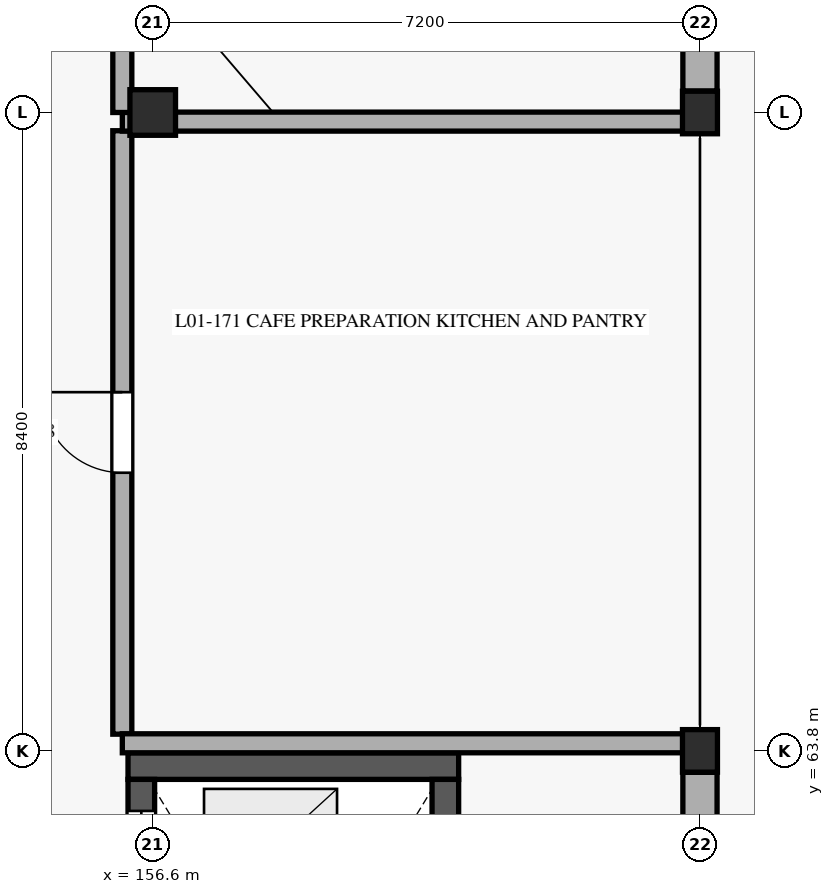
"""IFC4 building model, lengths in metres.
Left out: names, types, materials, properties, quantities, classifications, styles, units other than length and angle.
Written with IfcOpenShell. Run it as: python <this file> out.ifc"""

import sys

from ifc_helpers import new_model, si_unit, direction, frame, frame_2d, origin, origin_with_axes, origin_2d, place, context, subcontext, project, spatial, rectangle, extrude, element, fill, save


model = new_model("IFC4")
c1 = context("Model", 3, precision=1e-05, world=origin(), true_north=direction((0.0, 1.0)))
c2 = subcontext(c1, "Body", "Model", "MODEL_VIEW")
j1 = project(units=[si_unit("LENGTHUNIT", "METRE"), si_unit("PLANEANGLEUNIT", "RADIAN")], contexts=[c1])
p1 = place(None, origin())
s1 = spatial("IfcSite", under=j1, at=p1, CompositionType="ELEMENT")
p2 = place(p1, origin())
s2 = spatial("IfcBuilding", under=s1, at=p2, CompositionType="ELEMENT")
p3 = place(p2, origin())
s3 = spatial("IfcBuildingStorey", under=s2, at=p3, CompositionType="ELEMENT", Elevation=0.0)
p4 = place(p3, frame((156.6, 72.2, 0.0), z_axis=(0.0, 0.0, 1.0), x_axis=(1.0, 0.0, 0.0)))
e1 = element("IfcColumn", 1, at=p4, inside=s3, PredefinedType="COLUMN", context=c2, shape_type="SweptSolid", body=[
    extrude(rectangle(XDim=0.6, YDim=0.6, at=origin_2d()), origin(), (0.0, 0.0, 1.0), 4.8),
])
for number, where, z_axis, x_axis in (
    (2, (163.8, 63.8, 0.0), (0.0, 0.0, 1.0), (1.0, 0.0, 0.0)),
    (3, (163.8, 72.2, 0.0), (0.0, 0.0, 1.0), (1.0, 0.0, 0.0)),
):
    element("IfcColumn", number, at=place(p3, frame(where, z_axis=z_axis, x_axis=x_axis)), inside=s3, PredefinedType="COLUMN", context=c2, shape_type="SweptSolid", body=[
        extrude(rectangle(XDim=0.46, YDim=0.56, at=origin_2d()), origin(), (0.0, 0.0, 1.0), 4.8),
    ])
p5 = place(p3, frame((160.625, 63.6, 0.0), z_axis=(0.0, 0.0, 1.0), x_axis=(-1.0, 0.0, 0.0)))
e4 = element("IfcWall", 4, at=p5, inside=s3, PredefinedType="SHEAR", context=c2, shape_type="SweptSolid", body=[
    extrude(rectangle(XDim=4.35, YDim=0.35, at=frame_2d((2.175, 0.0))), origin(), (0.0, 0.0, 1.0), 4.5),
])
p6 = place(p3, frame((156.45, 63.425, 0.0), z_axis=(0.0, 0.0, 1.0), x_axis=(0.0, -1.0, 0.0)))
e5 = element("IfcWall", 5, at=p6, inside=s3, PredefinedType="SHEAR", context=c2, shape_type="SweptSolid", body=[
    extrude(rectangle(XDim=13.45, YDim=0.35, at=frame_2d((6.725, 0.0))), origin(), (0.0, 0.0, 1.0), 4.5),
])
p7 = place(p6, frame((12.15, 0.0, 0.0)))
e6 = element("IfcOpeningElement", 6, at=p7, cuts=e5, PredefinedType="OPENING", context=c2, shape_type="SweptSolid", body=[
    extrude(rectangle(XDim=1.1, YDim=2.2, at=frame_2d((0.55, 1.1))), frame((0.0, 0.185, 0.0), z_axis=(0.0, -1.0, 0.0), x_axis=(1.0, 0.0, 0.0)), (0.0, 0.0, 1.0), 0.37),
])
p8 = place(p6, frame((4.45, 0.0, 0.0)))
e7 = element("IfcOpeningElement", 7, at=p8, cuts=e5, PredefinedType="OPENING", context=c2, shape_type="SweptSolid", body=[
    extrude(rectangle(XDim=1.15, YDim=2.2, at=frame_2d((0.575, 1.1))), frame((0.0, 0.185, 0.0), z_axis=(0.0, -1.0, 0.0), x_axis=(1.0, 0.0, 0.0)), (0.0, 0.0, 1.0), 0.37),
])
p9 = place(p6, frame((2.315, 0.0, 0.0)))
e8 = element("IfcOpeningElement", 8, at=p9, cuts=e5, PredefinedType="OPENING", context=c2, shape_type="SweptSolid", body=[
    extrude(rectangle(XDim=1.02, YDim=2.15, at=frame_2d((0.51, 1.075))), frame((0.0, 0.185, 0.0), z_axis=(0.0, -1.0, 0.0), x_axis=(1.0, 0.0, 0.0)), (0.0, 0.0, 1.0), 0.37),
])
p10 = place(p6, frame((0.415, 0.0, 0.0)))
e9 = element("IfcOpeningElement", 9, at=p10, cuts=e5, PredefinedType="OPENING", context=c2, shape_type="SweptSolid", body=[
    extrude(rectangle(XDim=1.02, YDim=2.15, at=frame_2d((0.51, 1.075))), frame((0.0, 0.185, 0.0), z_axis=(0.0, -1.0, 0.0), x_axis=(1.0, 0.0, 0.0)), (0.0, 0.0, 1.0), 0.37),
])
p11 = place(p3, frame((160.45, 49.975, 0.0), z_axis=(0.0, 0.0, 1.0), x_axis=(0.0, 1.0, 0.0)))
e10 = element("IfcWall", 10, at=p11, inside=s3, PredefinedType="SHEAR", context=c2, shape_type="SweptSolid", body=[
    extrude(rectangle(XDim=13.45, YDim=0.35, at=frame_2d((6.725, 0.0))), origin(), (0.0, 0.0, 1.0), 4.5),
])
p12 = place(p11, frame((0.2, 0.0, 0.0)))
e11 = element("IfcOpeningElement", 11, at=p12, cuts=e10, PredefinedType="OPENING", context=c2, shape_type="SweptSolid", body=[
    extrude(rectangle(XDim=1.1, YDim=2.2, at=frame_2d((0.55, 1.1))), frame((0.0, 0.185, 0.0), z_axis=(0.0, -1.0, 0.0), x_axis=(1.0, 0.0, 0.0)), (0.0, 0.0, 1.0), 0.37),
])
p13 = place(p3, frame((163.8, 55.682, 0.0), z_axis=(0.0, 0.0, 1.0), x_axis=(0.0, 1.0, 0.0)))
e12 = element("IfcWall", 12, at=p13, inside=s3, PredefinedType="SOLIDWALL", context=c2, shape_type="SweptSolid", body=[
    extrude(rectangle(XDim=7.836, YDim=0.45, at=frame_2d((3.918, 0.0))), origin(), (0.0, 0.0, 1.0), 3.95),
])
p14 = place(p13, frame((1.862, 0.0, 0.65)))
e13 = element("IfcOpeningElement", 13, at=p14, cuts=e12, PredefinedType="OPENING", context=c2, shape_type="SweptSolid", body=[
    extrude(rectangle(XDim=1.5, YDim=2.2, at=frame_2d((0.75, 1.1))), frame((0.0, 0.235, 0.0), z_axis=(0.0, -1.0, 0.0), x_axis=(1.0, 0.0, 0.0)), (0.0, 0.0, 1.0), 0.47),
])
p15 = place(p13, frame((4.474, 0.0, 0.65)))
e14 = element("IfcOpeningElement", 14, at=p15, cuts=e12, PredefinedType="OPENING", context=c2, shape_type="SweptSolid", body=[
    extrude(rectangle(XDim=1.5, YDim=2.2, at=frame_2d((0.75, 1.1))), frame((0.0, 0.235, 0.0), z_axis=(0.0, -1.0, 0.0), x_axis=(1.0, 0.0, 0.0)), (0.0, 0.0, 1.0), 0.47),
])
p16 = place(p3, frame((163.8, 72.482, 0.0), z_axis=(0.0, 0.0, 1.0), x_axis=(0.0, 1.0, 0.0)))
e15 = element("IfcWall", 15, at=p16, inside=s3, PredefinedType="SOLIDWALL", context=c2, shape_type="SweptSolid", body=[
    extrude(rectangle(XDim=7.836, YDim=0.45, at=frame_2d((3.918, 0.0))), origin(), (0.0, 0.0, 1.0), 3.95),
])
p17 = place(p16, frame((1.862, 0.0, 0.65)))
e16 = element("IfcOpeningElement", 16, at=p17, cuts=e15, PredefinedType="OPENING", context=c2, shape_type="SweptSolid", body=[
    extrude(rectangle(XDim=1.5, YDim=2.2, at=frame_2d((0.75, 1.1))), frame((0.0, 0.235, 0.0), z_axis=(0.0, -1.0, 0.0), x_axis=(1.0, 0.0, 0.0)), (0.0, 0.0, 1.0), 0.47),
])
p18 = place(p16, frame((4.474, 0.0, 0.65)))
e17 = element("IfcOpeningElement", 17, at=p18, cuts=e15, PredefinedType="OPENING", context=c2, shape_type="SweptSolid", body=[
    extrude(rectangle(XDim=1.5, YDim=2.2, at=frame_2d((0.75, 1.1))), frame((0.0, 0.235, 0.0), z_axis=(0.0, -1.0, 0.0), x_axis=(1.0, 0.0, 0.0)), (0.0, 0.0, 1.0), 0.47),
])
p19 = place(p3, frame((156.2, 64.02, 0.0), z_axis=(0.0, 0.0, 1.0), x_axis=(0.0, 1.0, 0.0)))
e18 = element("IfcWall", 18, at=p19, inside=s3, PredefinedType="SOLIDWALL", context=c2, shape_type="SweptSolid", body=[
    extrude(rectangle(XDim=7.94, YDim=0.25, at=frame_2d((3.97, 0.0))), origin(), (0.0, 0.0, 1.0), 4.095),
])
p20 = place(p19, frame((3.44, 0.0, 0.0)))
e19 = element("IfcOpeningElement", 19, at=p20, cuts=e18, PredefinedType="OPENING", context=c2, shape_type="SweptSolid", body=[
    extrude(rectangle(XDim=1.06, YDim=2.2, at=frame_2d((0.53, 1.1))), frame((0.0, 0.135, 0.0), z_axis=(0.0, -1.0, 0.0), x_axis=(1.0, 0.0, 0.0)), (0.0, 0.0, 1.0), 0.27),
])
for number, where, z_axis, x_axis in (
    (20, (156.2, 63.9, 0.0), (0.0, 0.0, 1.0), (1.0, 0.0, 0.0)),
    (21, (156.2, 72.08, 0.0), (0.0, 0.0, 1.0), (1.0, 0.0, 0.0)),
):
    element("IfcWall", number, at=place(p3, frame(where, z_axis=z_axis, x_axis=x_axis)), inside=s3, PredefinedType="SOLIDWALL", context=c2, shape_type="SweptSolid", body=[
        extrude(rectangle(XDim=7.375, YDim=0.25, at=frame_2d((3.688, 0.0))), origin(), (0.0, 0.0, 1.0), 4.095),
    ])
p21 = place(p3, frame((156.2, 72.2, 0.0), z_axis=(0.0, 0.0, 1.0), x_axis=(0.0, 1.0, 0.0)))
e22 = element("IfcWall", 22, at=p21, inside=s3, PredefinedType="SOLIDWALL", context=c2, shape_type="SweptSolid", body=[
    extrude(rectangle(XDim=6.35, YDim=0.25, at=frame_2d((3.175, 0.0))), origin(), (0.0, 0.0, 1.0), 4.495),
])
p22 = place(p21, frame((2.52, 0.0, 0.0)))
e23 = element("IfcOpeningElement", 23, at=p22, cuts=e22, PredefinedType="OPENING", context=c2, shape_type="SweptSolid", body=[
    extrude(rectangle(XDim=1.16, YDim=2.2, at=frame_2d((0.58, 1.1))), frame((0.0, 0.135, 0.0), z_axis=(0.0, -1.0, 0.0), x_axis=(1.0, 0.0, 0.0)), (0.0, 0.0, 1.0), 0.27),
])
p23 = place(p10, origin_with_axes())
e24 = element("IfcDoor", 24, at=p23, inside=s3, OperationType="SLIDING_TO_LEFT", PredefinedType="DOOR", context=c2, shape_type="SweptSolid", body=[
    extrude(rectangle(XDim=1.02, YDim=2.15, at=frame_2d((0.51, 1.075))), frame((0.0, 0.025, 0.0), z_axis=(0.0, -1.0, 0.0), x_axis=(1.0, 0.0, 0.0)), (0.0, 0.0, 1.0), 0.05),
])
fill(e9, e24)
p24 = place(p20, frame((1.06, 0.0, 0.0), z_axis=(0.0, 0.0, 1.0), x_axis=(-1.0, 0.0, 0.0)))
e25 = element("IfcDoor", 25, at=p24, inside=s3, OperationType="SINGLE_SWING_LEFT", PredefinedType="DOOR", context=c2, shape_type="SweptSolid", body=[
    extrude(rectangle(XDim=1.06, YDim=2.2, at=frame_2d((0.53, 1.1))), frame((0.0, 0.025, 0.0), z_axis=(0.0, -1.0, 0.0), x_axis=(1.0, 0.0, 0.0)), (0.0, 0.0, 1.0), 0.05),
])
fill(e19, e25)
save(model, sys.argv[1])
